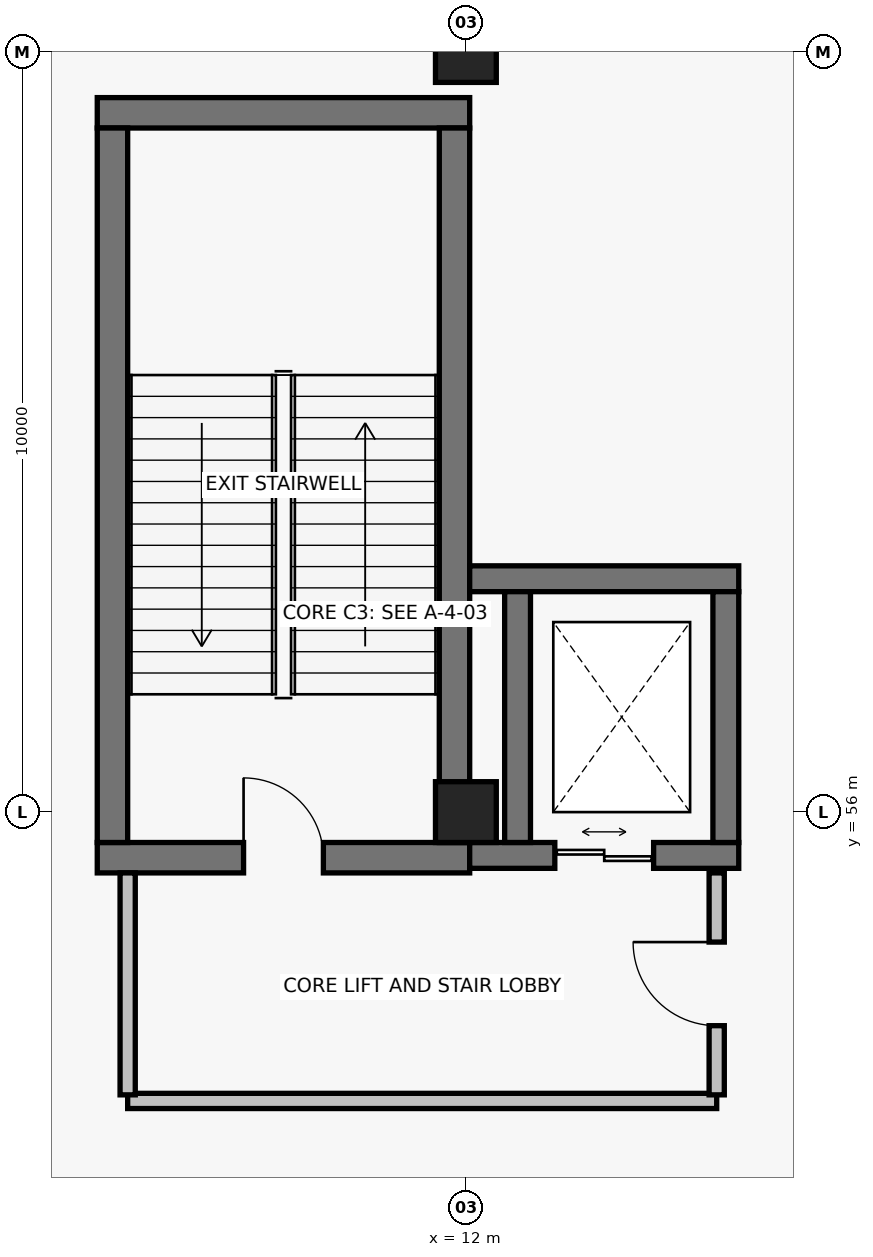
"""IFC4 building model, lengths in metres.
Left out: names, types, materials, properties, quantities, classifications, styles, units other than length and angle.
Written with IfcOpenShell. Run it as: python <this file> out.ifc"""

import sys

from ifc_helpers import new_model, si_unit, direction, frame, frame_2d, origin, origin_2d, place, context, subcontext, project, spatial, rectangle, extrude, element, fill, save


model = new_model("IFC4")
c1 = context("Model", 3, precision=1e-05, world=origin(), true_north=direction((0.0, 1.0)))
c2 = subcontext(c1, "Body", "Model", "MODEL_VIEW")
j1 = project(units=[si_unit("LENGTHUNIT", "METRE"), si_unit("PLANEANGLEUNIT", "RADIAN")], contexts=[c1])
p1 = place(None, origin())
s1 = spatial("IfcSite", under=j1, at=p1, CompositionType="ELEMENT")
p2 = place(p1, origin())
s2 = spatial("IfcBuilding", under=s1, at=p2, CompositionType="ELEMENT")
p3 = place(p2, frame((0.0, 0.0, -10.4)))
s3 = spatial("IfcBuildingStorey", under=s2, at=p3, CompositionType="ELEMENT", Elevation=-10.4)
for number, where, z_axis, x_axis in (
    (1, (12.0, 56.0, 0.0), (0.0, 0.0, 1.0), (1.0, 0.0, 0.0)),
    (2, (12.0, 66.0, 0.0), (0.0, 0.0, 1.0), (1.0, 0.0, 0.0)),
):
    element("IfcColumn", number, at=place(p3, frame(where, z_axis=z_axis, x_axis=x_axis)), inside=s3, PredefinedType="COLUMN", context=c2, shape_type="SweptSolid", body=[
        extrude(rectangle(XDim=0.8, YDim=0.8, at=origin_2d()), origin(), (0.0, 0.0, 1.0), 5.6),
    ])
p4 = place(p3, frame((7.15, 55.4, 0.0), z_axis=(0.0, 0.0, 1.0), x_axis=(1.0, 0.0, 0.0)))
e3 = element("IfcWall", 3, at=p4, inside=s3, PredefinedType="SHEAR", context=c2, shape_type="SweptSolid", body=[
    extrude(rectangle(XDim=4.9, YDim=0.4, at=frame_2d((2.45, 0.0))), origin(), (0.0, 0.0, 1.0), 5.15),
])
p5 = place(p4, frame((1.925, 0.0, 0.0)))
e4 = element("IfcOpeningElement", 4, at=p5, cuts=e3, PredefinedType="OPENING", context=c2, shape_type="SweptSolid", body=[
    extrude(rectangle(XDim=1.05, YDim=2.15, at=frame_2d((0.525, 1.075))), frame((0.0, 0.215, 0.0), z_axis=(0.0, -1.0, 0.0), x_axis=(1.0, 0.0, 0.0)), (0.0, 0.0, 1.0), 0.43),
])
p6 = place(p3, frame((12.05, 65.2, 0.0), z_axis=(0.0, 0.0, 1.0), x_axis=(-1.0, 0.0, 0.0)))
e5 = element("IfcWall", 5, at=p6, inside=s3, PredefinedType="SHEAR", context=c2, shape_type="SweptSolid", body=[
    extrude(rectangle(XDim=4.9, YDim=0.4, at=frame_2d((2.45, 0.0))), origin(), (0.0, 0.0, 1.0), 5.15),
])
for number, where, z_axis, x_axis in (
    (6, (7.35, 65.0, 0.0), (0.0, 0.0, 1.0), (0.0, -1.0, 0.0)),
    (7, (11.85, 55.6, 0.0), (0.0, 0.0, 1.0), (0.0, 1.0, 0.0)),
):
    element("IfcWall", number, at=place(p3, frame(where, z_axis=z_axis, x_axis=x_axis)), inside=s3, PredefinedType="SHEAR", context=c2, shape_type="SweptSolid", body=[
        extrude(rectangle(XDim=9.4, YDim=0.4, at=frame_2d((4.7, 0.0))), origin(), (0.0, 0.0, 1.0), 5.15),
    ])
p7 = place(p3, frame((12.05, 55.43, 0.0), z_axis=(0.0, 0.0, 1.0), x_axis=(1.0, 0.0, 0.0)))
e8 = element("IfcWall", 8, at=p7, inside=s3, PredefinedType="SHEAR", context=c2, shape_type="SweptSolid", body=[
    extrude(rectangle(XDim=3.54, YDim=0.34, at=frame_2d((1.77, 0.0))), origin(), (0.0, 0.0, 1.0), 5.15),
])
p8 = place(p7, frame((1.12, 0.0, 0.0)))
e9 = element("IfcOpeningElement", 9, at=p8, cuts=e8, PredefinedType="OPENING", context=c2, shape_type="SweptSolid", body=[
    extrude(rectangle(XDim=1.3, YDim=2.25, at=frame_2d((0.65, 1.125))), frame((0.0, 0.185, 0.0), z_axis=(0.0, -1.0, 0.0), x_axis=(1.0, 0.0, 0.0)), (0.0, 0.0, 1.0), 0.37),
])
p9 = place(p3, frame((15.59, 59.07, 0.0), z_axis=(0.0, 0.0, 1.0), x_axis=(-1.0, 0.0, 0.0)))
e10 = element("IfcWall", 10, at=p9, inside=s3, PredefinedType="SHEAR", context=c2, shape_type="SweptSolid", body=[
    extrude(rectangle(XDim=3.54, YDim=0.34, at=frame_2d((1.77, 0.0))), origin(), (0.0, 0.0, 1.0), 5.15),
])
for number, where, z_axis, x_axis in (
    (11, (12.68, 58.9, 0.0), (0.0, 0.0, 1.0), (0.0, -1.0, 0.0)),
    (12, (15.42, 55.6, 0.0), (0.0, 0.0, 1.0), (0.0, 1.0, 0.0)),
):
    element("IfcWall", number, at=place(p3, frame(where, z_axis=z_axis, x_axis=x_axis)), inside=s3, PredefinedType="SHEAR", context=c2, shape_type="SweptSolid", body=[
        extrude(rectangle(XDim=3.3, YDim=0.34, at=frame_2d((1.65, 0.0))), origin(), (0.0, 0.0, 1.0), 5.15),
    ])
p10 = place(p3, frame((7.55, 52.2, 0.0), z_axis=(0.0, 0.0, 1.0), x_axis=(1.0, 0.0, 0.0)))
e13 = element("IfcWall", 13, at=p10, inside=s3, PredefinedType="PARTITIONING", context=c2, shape_type="SweptSolid", body=[
    extrude(rectangle(XDim=7.75, YDim=0.2, at=frame_2d((3.875, 0.0))), origin(), (0.0, 0.0, 1.0), 4.68),
])
p11 = place(p3, frame((7.55, 55.2, 0.0), z_axis=(0.0, 0.0, 1.0), x_axis=(0.0, -1.0, 0.0)))
e14 = element("IfcWall", 14, at=p11, inside=s3, PredefinedType="PARTITIONING", context=c2, shape_type="SweptSolid", body=[
    extrude(rectangle(XDim=2.92, YDim=0.2, at=frame_2d((1.46, 0.0))), origin(), (0.0, 0.0, 1.0), 5.15),
])
p12 = place(p3, frame((15.3, 52.28, 0.0), z_axis=(0.0, 0.0, 1.0), x_axis=(0.0, 1.0, 0.0)))
e15 = element("IfcWall", 15, at=p12, inside=s3, PredefinedType="PARTITIONING", context=c2, shape_type="SweptSolid", body=[
    extrude(rectangle(XDim=2.92, YDim=0.2, at=frame_2d((1.46, 0.0))), origin(), (0.0, 0.0, 1.0), 5.15),
])
p13 = place(p12, frame((0.91, 0.0, 0.0)))
e16 = element("IfcOpeningElement", 16, at=p13, cuts=e15, PredefinedType="OPENING", context=c2, shape_type="SweptSolid", body=[
    extrude(rectangle(XDim=1.1, YDim=2.15, at=frame_2d((0.55, 1.075))), frame((0.0, 0.115, 0.0), z_axis=(0.0, -1.0, 0.0), x_axis=(1.0, 0.0, 0.0)), (0.0, 0.0, 1.0), 0.23),
])
p14 = place(p5, origin())
e17 = element("IfcDoor", 17, at=p14, inside=s3, OperationType="SINGLE_SWING_LEFT", PredefinedType="DOOR", context=c2, shape_type="SweptSolid", body=[
    extrude(rectangle(XDim=1.05, YDim=2.15, at=frame_2d((0.525, 1.075))), frame((0.0, 0.025, 0.0), z_axis=(0.0, -1.0, 0.0), x_axis=(1.0, 0.0, 0.0)), (0.0, 0.0, 1.0), 0.05),
])
fill(e4, e17)
p15 = place(p8, origin())
e18 = element("IfcDoor", 18, at=p15, inside=s3, OperationType="DOUBLE_DOOR_SLIDING", PredefinedType="DOOR", context=c2, shape_type="SweptSolid", body=[
    extrude(rectangle(XDim=1.3, YDim=2.25, at=frame_2d((0.65, 1.125))), frame((0.0, 0.025, 0.0), z_axis=(0.0, -1.0, 0.0), x_axis=(1.0, 0.0, 0.0)), (0.0, 0.0, 1.0), 0.05),
])
fill(e9, e18)
p16 = place(p13, origin())
e19 = element("IfcDoor", 19, at=p16, inside=s3, OperationType="SINGLE_SWING_RIGHT", PredefinedType="DOOR", context=c2, shape_type="SweptSolid", body=[
    extrude(rectangle(XDim=1.1, YDim=2.15, at=frame_2d((0.55, 1.075))), frame((0.0, 0.025, 0.0), z_axis=(0.0, -1.0, 0.0), x_axis=(1.0, 0.0, 0.0)), (0.0, 0.0, 1.0), 0.05),
])
fill(e16, e19)
save(model, sys.argv[1])
